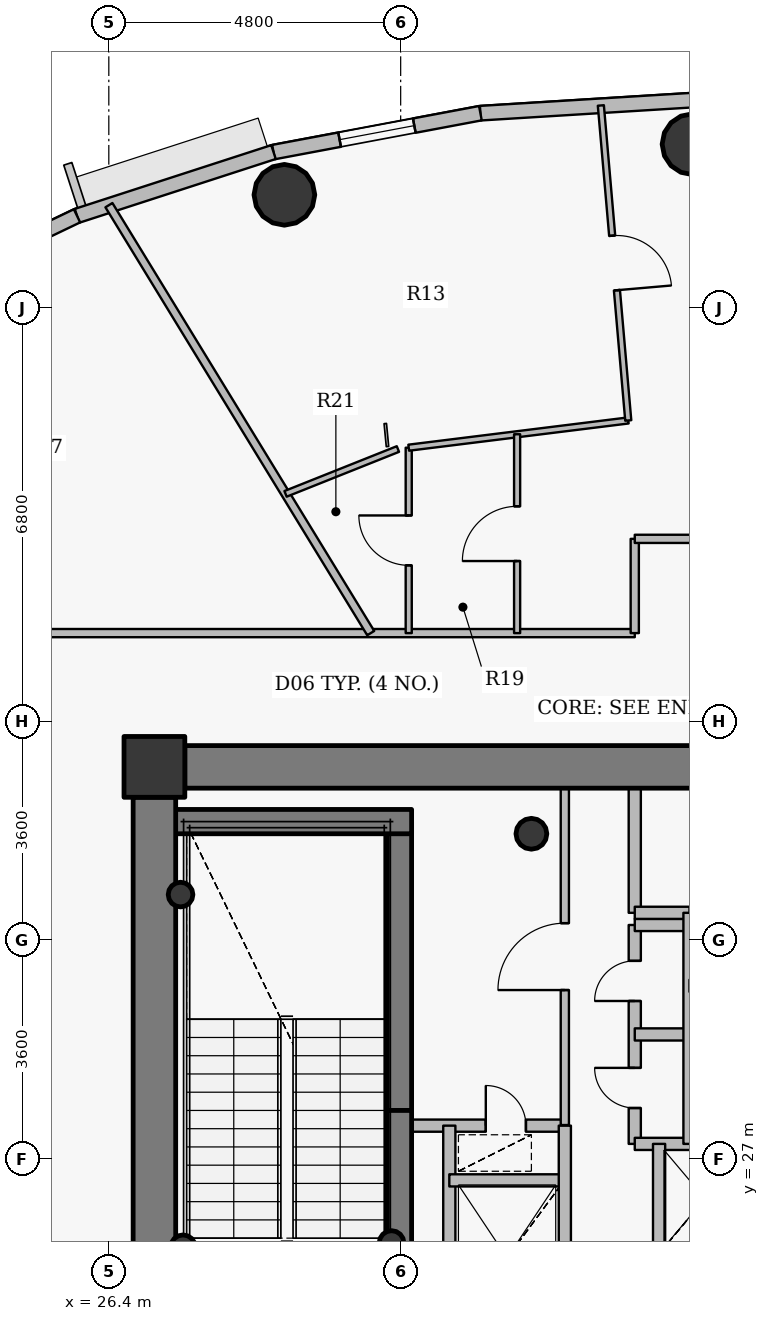
"""IFC4 building model, lengths in metres.
Left out: names, types, materials, properties, quantities, classifications, styles, units other than length and angle.
Written with IfcOpenShell. Run it as: python <this file> out.ifc"""

import sys

from ifc_helpers import new_model, si_unit, direction, frame, frame_2d, origin, origin_2d, place, context, subcontext, project, spatial, rectangle, hollow_circle, extrude, source, transform, mapped, element, fill, save


model = new_model("IFC4")
c1 = context("Model", 3, precision=1e-05, world=origin(), true_north=direction((0.0, 1.0)))
c2 = subcontext(c1, "Body", "Model", "MODEL_VIEW")
j1 = project(units=[si_unit("LENGTHUNIT", "METRE"), si_unit("PLANEANGLEUNIT", "RADIAN")], contexts=[c1])
p1 = place(None, origin())
s1 = spatial("IfcSite", under=j1, at=p1, CompositionType="ELEMENT")
p2 = place(p1, origin())
s2 = spatial("IfcBuilding", under=s1, at=p2, CompositionType="ELEMENT")
p3 = place(p2, frame((0.0, 0.0, 291.75)))
s3 = spatial("IfcBuildingStorey", under=s2, at=p3, CompositionType="ELEMENT", Elevation=291.75)
p4 = place(p3, frame((27.15, 33.45, 0.0), z_axis=(0.0, 0.0, 1.0), x_axis=(1.0, 0.0, 0.0)))
e1 = element("IfcColumn", 1, at=p4, inside=s3, PredefinedType="COLUMN", context=c2, shape_type="SweptSolid", body=[
    extrude(rectangle(XDim=1.0, YDim=1.0, at=origin_2d()), origin(), (0.0, 0.0, 1.0), 3.75),
])
p5 = place(p3, frame((33.35, 32.35, 0.0), z_axis=(0.0, 0.0, 1.0), x_axis=(1.0, 0.0, 0.0)))
e2 = element("IfcColumn", 2, at=p5, inside=s3, PredefinedType="COLUMN", context=c2, shape_type="SweptSolid", body=[
    extrude(hollow_circle(Radius=0.254, WallThickness=0.02, at=origin_2d()), origin(), (0.0, 0.0, 1.0), 3.75),
])
p6 = place(p3, frame((31.18, 27.8, 0.0), z_axis=(0.0, 0.0, 1.0), x_axis=(0.0, 1.0, 0.0)))
e3 = element("IfcWall", 3, at=p6, inside=s3, PredefinedType="SHEAR", context=c2, shape_type="SweptSolid", body=[
    extrude(rectangle(XDim=4.75, YDim=0.4, at=frame_2d((2.375, 0.0))), origin(), (0.0, 0.0, 1.0), 3.75),
])
p7 = place(p3, frame((27.25, 32.55, 0.0), z_axis=(0.0, 0.0, 1.0), x_axis=(1.0, 0.0, 0.0)))
e4 = element("IfcWall", 4, at=p7, inside=s3, PredefinedType="SHEAR", context=c2, shape_type="SweptSolid", body=[
    extrude(rectangle(XDim=4.13, YDim=0.4, at=frame_2d((2.065, 0.0))), origin(), (0.0, 0.0, 1.0), 3.75),
])
for number, where, z_axis, x_axis in (
    (5, (27.58, 31.35, 0.0), (0.0, 0.0, 1.0), (1.0, 0.0, 0.0)),
    (6, (31.05, 25.62, 0.0), (0.0, 0.0, 1.0), (1.0, 0.0, 0.0)),
    (7, (27.62, 25.55, 0.0), (0.0, 0.0, 1.0), (1.0, 0.0, 0.0)),
):
    element("IfcColumn", number, at=place(p3, frame(where, z_axis=z_axis, x_axis=x_axis)), inside=s3, PredefinedType="COLUMN", context=c2, shape_type="SweptSolid", body=[
        extrude(hollow_circle(Radius=0.203, WallThickness=0.016, at=origin_2d()), origin(), (0.0, 0.0, 1.0), 3.75),
    ])
p8 = place(p3, frame((27.65, 33.45, 0.0), z_axis=(0.0, 0.0, 1.0), x_axis=(1.0, 0.0, 0.0)))
e8 = element("IfcWall", 8, at=p8, inside=s3, PredefinedType="SHEAR", context=c2, shape_type="SweptSolid", body=[
    extrude(rectangle(XDim=16.7, YDim=0.7, at=frame_2d((8.35, 0.0))), origin(), (0.0, 0.0, 1.0), 3.05),
])
p9 = place(p8, frame((12.775, 0.0, 0.0)))
e9 = element("IfcOpeningElement", 9, at=p9, cuts=e8, PredefinedType="OPENING", context=c2, shape_type="SweptSolid", body=[
    extrude(rectangle(XDim=1.15, YDim=2.15, at=origin_2d()), frame((0.575, 0.36, 1.075), z_axis=(0.0, -1.0, 0.0), x_axis=(1.0, 0.0, 0.0)), (0.0, 0.0, 1.0), 0.72),
])
p10 = place(p3, frame((27.15, 21.05, 0.0), z_axis=(0.0, 0.0, 1.0), x_axis=(0.0, 1.0, 0.0)))
e10 = element("IfcWall", 10, at=p10, inside=s3, PredefinedType="SHEAR", context=c2, shape_type="SweptSolid", body=[
    extrude(rectangle(XDim=11.9, YDim=0.7, at=frame_2d((5.95, 0.0))), origin(), (0.0, 0.0, 1.0), 3.05),
])
p11 = place(p3, frame((31.18, 25.55, 0.0), z_axis=(0.0, 0.0, 1.0), x_axis=(0.0, 1.0, 0.0)))
e11 = element("IfcWall", 11, at=p11, inside=s3, PredefinedType="SHEAR", context=c2, shape_type="SweptSolid", body=[
    extrude(rectangle(XDim=2.25, YDim=0.4, at=frame_2d((1.125, 0.0))), origin(), (0.0, 0.0, 1.0), 3.1),
])
for number, where, z_axis, x_axis in (
    (12, (36.0, 43.69, 0.0), (0.0, 0.0, 1.0), (1.0, 0.0, 0.0)),
    (13, (29.288, 42.858, 0.0), (0.0, 0.0, 1.0), (1.0, 0.0, 0.0)),
):
    element("IfcColumn", number, at=place(p3, frame(where, z_axis=z_axis, x_axis=x_axis)), inside=s3, PredefinedType="COLUMN", context=c2, shape_type="SweptSolid", body=[
        extrude(hollow_circle(Radius=0.5, WallThickness=0.032, at=origin_2d()), origin(), (0.0, 0.0, 1.0), 3.75),
    ])
p12 = place(p3, frame((32.511, 44.2, 0.0), z_axis=(0.0, 0.0, 1.0), x_axis=(0.998104946479, 0.061534671648, 0.0)))
e14 = element("IfcWall", 14, at=p12, inside=s3, PredefinedType="SOLIDWALL", context=c2, shape_type="SweptSolid", body=[
    extrude(rectangle(XDim=3.495, YDim=0.24, at=frame_2d((1.748, 0.0))), origin(), (0.0, 0.0, 1.0), 3.5),
])
p13 = place(p3, frame((29.109, 43.56, 0.0), z_axis=(0.0, 0.0, 1.0), x_axis=(0.982782655757, 0.184765395959, 0.0)))
e15 = element("IfcWall", 15, at=p13, inside=s3, PredefinedType="SOLIDWALL", context=c2, shape_type="SweptSolid", body=[
    extrude(rectangle(XDim=3.462, YDim=0.24, at=frame_2d((1.731, 0.0))), origin(), (0.0, 0.0, 1.0), 3.5),
])
p14 = place(p13, frame((1.106, 0.0, 0.9)))
e16 = element("IfcOpeningElement", 16, at=p14, cuts=e15, PredefinedType="OPENING", context=c2, shape_type="SweptSolid", body=[
    extrude(rectangle(XDim=1.25, YDim=1.65, at=origin_2d()), frame((0.625, 0.13, 0.825), z_axis=(0.0, -1.0, 0.0), x_axis=(1.0, 0.0, 0.0)), (0.0, 0.0, 1.0), 0.26),
])
p15 = place(p3, frame((25.877, 42.512, 0.0), z_axis=(0.0, 0.0, 1.0), x_axis=(0.95123136723, 0.308478339592, 0.0)))
e17 = element("IfcWall", 17, at=p15, inside=s3, PredefinedType="SOLIDWALL", context=c2, shape_type="SweptSolid", body=[
    extrude(rectangle(XDim=3.398, YDim=0.24, at=frame_2d((1.699, 0.0))), origin(), (0.0, 0.0, 1.0), 3.5),
])
p16 = place(p3, frame((22.896, 41.082, 0.0), z_axis=(0.0, 0.0, 1.0), x_axis=(0.901573741254, 0.43262546051, 0.0)))
e18 = element("IfcWall", 18, at=p16, inside=s3, PredefinedType="SOLIDWALL", context=c2, shape_type="SweptSolid", body=[
    extrude(rectangle(XDim=3.307, YDim=0.24, at=frame_2d((1.653, 0.0))), origin(), (0.0, 0.0, 1.0), 3.5),
])
p17 = place(p16, frame((0.854, 0.0, 0.9)))
e19 = element("IfcOpeningElement", 19, at=p17, cuts=e18, PredefinedType="OPENING", context=c2, shape_type="SweptSolid", body=[
    extrude(rectangle(XDim=1.6, YDim=1.75, at=origin_2d()), frame((0.8, 0.13, 0.875), z_axis=(0.0, -1.0, 0.0), x_axis=(1.0, 0.0, 0.0)), (0.0, 0.0, 1.0), 0.26),
])
p18 = place(p3, frame((24.95, 35.65, 0.0), z_axis=(0.0, 0.0, 1.0), x_axis=(1.0, 0.0, 0.0)))
e20 = element("IfcWall", 20, at=p18, inside=s3, PredefinedType="PARTITIONING", context=c2, shape_type="SweptSolid", body=[
    extrude(rectangle(XDim=10.1, YDim=0.135, at=frame_2d((5.05, 0.0))), origin(), (0.0, 0.0, 1.0), 3.035),
])
p19 = place(p3, frame((26.402, 42.688, 0.0), z_axis=(0.0, 0.0, 1.0), x_axis=(0.521891606098, -0.853011812043, 0.0)))
e21 = element("IfcWall", 21, at=p19, inside=s3, PredefinedType="PARTITIONING", context=c2, shape_type="SweptSolid", body=[
    extrude(rectangle(XDim=8.25, YDim=0.135, at=frame_2d((4.125, 0.0))), origin(), (0.0, 0.0, 1.0), 2.985),
])
p20 = place(p3, frame((29.307, 37.94, 0.0), z_axis=(0.0, 0.0, 1.0), x_axis=(0.928797929692, 0.370586569913, 0.0)))
e22 = element("IfcWall", 22, at=p20, inside=s3, PredefinedType="PARTITIONING", context=c2, shape_type="SweptSolid", body=[
    extrude(rectangle(XDim=1.99, YDim=0.1, at=frame_2d((0.995, 0.0))), origin(), (0.0, 0.0, 1.0), 3.035),
])
p21 = place(p3, frame((31.1, 27.55, 0.0), z_axis=(0.0, 0.0, 1.0), x_axis=(1.0, 0.0, 0.0)))
e23 = element("IfcWall", 23, at=p21, inside=s3, PredefinedType="PARTITIONING", context=c2, shape_type="SweptSolid", body=[
    extrude(rectangle(XDim=2.8, YDim=0.2, at=frame_2d((1.4, 0.0))), origin(), (0.0, 0.0, 1.0), 3.085),
])
p22 = place(p21, frame((1.5, 0.0, 0.0)))
e24 = element("IfcOpeningElement", 24, at=p22, cuts=e23, PredefinedType="OPENING", context=c2, shape_type="SweptSolid", body=[
    extrude(rectangle(XDim=0.66, YDim=2.05, at=origin_2d()), frame((0.33, 0.11, 1.025), z_axis=(0.0, -1.0, 0.0), x_axis=(1.0, 0.0, 0.0)), (0.0, 0.0, 1.0), 0.22),
])
p23 = place(p3, frame((31.333, 35.65, 0.0), z_axis=(0.0, 0.0, 1.0), x_axis=(0.0, 1.0, 0.0)))
e25 = element("IfcWall", 25, at=p23, inside=s3, PredefinedType="PARTITIONING", context=c2, shape_type="SweptSolid", body=[
    extrude(rectangle(XDim=3.049, YDim=0.1, at=frame_2d((1.525, 0.0))), origin(), (0.0, 0.0, 1.0), 3.035),
])
p24 = place(p23, frame((1.115, 0.0, 0.0)))
e26 = element("IfcOpeningElement", 26, at=p24, cuts=e25, PredefinedType="OPENING", context=c2, shape_type="SweptSolid", body=[
    extrude(rectangle(XDim=0.82, YDim=2.1, at=origin_2d()), frame((0.41, 0.06, 1.05), z_axis=(0.0, -1.0, 0.0), x_axis=(1.0, 0.0, 0.0)), (0.0, 0.0, 1.0), 0.12),
])
p25 = place(p3, frame((31.333, 38.699, 0.0), z_axis=(0.0, 0.0, 1.0), x_axis=(0.992398193069, 0.123068380965, 0.0)))
e27 = element("IfcWall", 27, at=p25, inside=s3, PredefinedType="PARTITIONING", context=c2, shape_type="SweptSolid", body=[
    extrude(rectangle(XDim=3.638, YDim=0.1, at=frame_2d((1.819, 0.0))), origin(), (0.0, 0.0, 1.0), 3.185),
])
p26 = place(p3, frame((32.0, 24.1, 0.0), z_axis=(0.0, 0.0, 1.0), x_axis=(0.0, 1.0, 0.0)))
e28 = element("IfcWall", 28, at=p26, inside=s3, PredefinedType="PARTITIONING", context=c2, shape_type="SweptSolid", body=[
    extrude(rectangle(XDim=3.45, YDim=0.2, at=frame_2d((1.725, 0.0))), origin(), (0.0, 0.0, 1.0), 3.5),
])
p27 = place(p3, frame((32.0, 26.65, 0.0), z_axis=(0.0, 0.0, 1.0), x_axis=(1.0, 0.0, 0.0)))
e29 = element("IfcWall", 29, at=p27, inside=s3, PredefinedType="PARTITIONING", context=c2, shape_type="SweptSolid", body=[
    extrude(rectangle(XDim=1.9, YDim=0.2, at=frame_2d((0.95, 0.0))), origin(), (0.0, 0.0, 1.0), 3.085),
])
p28 = place(p3, frame((33.115, 35.65, 0.0), z_axis=(0.0, 0.0, 1.0), x_axis=(0.0, 1.0, 0.0)))
e30 = element("IfcWall", 30, at=p28, inside=s3, PredefinedType="PARTITIONING", context=c2, shape_type="SweptSolid", body=[
    extrude(rectangle(XDim=3.27, YDim=0.1, at=frame_2d((1.635, 0.0))), origin(), (0.0, 0.0, 1.0), 3.5),
])
p29 = place(p28, frame((1.185, 0.0, 0.0)))
e31 = element("IfcOpeningElement", 31, at=p29, cuts=e30, PredefinedType="OPENING", context=c2, shape_type="SweptSolid", body=[
    extrude(rectangle(XDim=0.9, YDim=2.1, at=origin_2d()), frame((0.45, 0.06, 1.05), z_axis=(0.0, -1.0, 0.0), x_axis=(1.0, 0.0, 0.0)), (0.0, 0.0, 1.0), 0.12),
])
p30 = place(p3, frame((33.9, 20.9, 0.0), z_axis=(0.0, 0.0, 1.0), x_axis=(0.0, 1.0, 0.0)))
e32 = element("IfcWall", 32, at=p30, inside=s3, PredefinedType="PARTITIONING", context=c2, shape_type="SweptSolid", body=[
    extrude(rectangle(XDim=6.65, YDim=0.2, at=frame_2d((3.325, 0.0))), origin(), (0.0, 0.0, 1.0), 3.085),
])
p31 = place(p3, frame((33.9, 27.56, 0.0), z_axis=(0.0, 0.0, 1.0), x_axis=(0.0, 1.0, 0.0)))
e33 = element("IfcWall", 33, at=p31, inside=s3, PredefinedType="PARTITIONING", context=c2, shape_type="SweptSolid", body=[
    extrude(rectangle(XDim=5.54, YDim=0.135, at=frame_2d((2.77, 0.0))), origin(), (0.0, 0.0, 1.0), 3.085),
])
p32 = place(p31, frame((2.22, 0.0, 0.0)))
e34 = element("IfcOpeningElement", 34, at=p32, cuts=e33, PredefinedType="OPENING", context=c2, shape_type="SweptSolid", body=[
    extrude(rectangle(XDim=1.1, YDim=2.15, at=origin_2d()), frame((0.55, 0.078, 1.075), z_axis=(0.0, -1.0, 0.0), x_axis=(1.0, 0.0, 0.0)), (0.0, 0.0, 1.0), 0.155),
])
p33 = place(p3, frame((34.492, 44.327, 0.0), z_axis=(0.0, 0.0, 1.0), x_axis=(0.086674190257, -0.9962367112, 0.0)))
e35 = element("IfcWall", 35, at=p33, inside=s3, PredefinedType="PARTITIONING", context=c2, shape_type="SweptSolid", body=[
    extrude(rectangle(XDim=5.2, YDim=0.1, at=frame_2d((2.6, 0.0))), origin(), (0.0, 0.0, 1.0), 2.985),
])
p34 = place(p33, frame((2.15, 0.0, 0.0)))
e36 = element("IfcOpeningElement", 36, at=p34, cuts=e35, PredefinedType="OPENING", context=c2, shape_type="SweptSolid", body=[
    extrude(rectangle(XDim=0.9, YDim=2.1, at=origin_2d()), frame((0.45, 0.06, 1.05), z_axis=(0.0, -1.0, 0.0), x_axis=(1.0, 0.0, 0.0)), (0.0, 0.0, 1.0), 0.12),
])
p35 = place(p3, frame((35.05, 27.25, 0.0), z_axis=(0.0, 0.0, 1.0), x_axis=(0.0, 1.0, 0.0)))
e37 = element("IfcWall", 37, at=p35, inside=s3, PredefinedType="PARTITIONING", context=c2, shape_type="SweptSolid", body=[
    extrude(rectangle(XDim=3.6, YDim=0.2, at=frame_2d((1.8, 0.0))), origin(), (0.0, 0.0, 1.0), 3.5),
])
p36 = place(p35, frame((0.59, 0.0, 0.0)))
e38 = element("IfcOpeningElement", 38, at=p36, cuts=e37, PredefinedType="OPENING", context=c2, shape_type="SweptSolid", body=[
    extrude(rectangle(XDim=0.66, YDim=2.05, at=origin_2d()), frame((0.33, 0.11, 1.025), z_axis=(0.0, -1.0, 0.0), x_axis=(1.0, 0.0, 0.0)), (0.0, 0.0, 1.0), 0.22),
])
p37 = place(p35, frame((2.35, 0.0, 0.0)))
e39 = element("IfcOpeningElement", 39, at=p37, cuts=e37, PredefinedType="OPENING", context=c2, shape_type="SweptSolid", body=[
    extrude(rectangle(XDim=0.66, YDim=2.05, at=origin_2d()), frame((0.33, 0.11, 1.025), z_axis=(0.0, -1.0, 0.0), x_axis=(1.0, 0.0, 0.0)), (0.0, 0.0, 1.0), 0.22),
])
p38 = place(p3, frame((35.05, 27.25, 0.0), z_axis=(0.0, 0.0, 1.0), x_axis=(1.0, 0.0, 0.0)))
e40 = element("IfcWall", 40, at=p38, inside=s3, PredefinedType="PARTITIONING", context=c2, shape_type="SweptSolid", body=[
    extrude(rectangle(XDim=4.95, YDim=0.2, at=frame_2d((2.475, 0.0))), origin(), (0.0, 0.0, 1.0), 3.085),
])
for number, where, z_axis, x_axis in (
    (41, (35.05, 29.05, 0.0), (0.0, 0.0, 1.0), (1.0, 0.0, 0.0)),
    (42, (35.05, 30.85, 0.0), (0.0, 0.0, 1.0), (1.0, 0.0, 0.0)),
):
    element("IfcWall", number, at=place(p3, frame(where, z_axis=z_axis, x_axis=x_axis)), inside=s3, PredefinedType="PARTITIONING", context=c2, shape_type="SweptSolid", body=[
        extrude(rectangle(XDim=0.9, YDim=0.2, at=frame_2d((0.45, 0.0))), origin(), (0.0, 0.0, 1.0), 3.5),
    ])
p39 = place(p3, frame((35.05, 31.05, 0.0), z_axis=(0.0, 0.0, 1.0), x_axis=(0.0, 1.0, 0.0)))
e43 = element("IfcWall", 43, at=p39, inside=s3, PredefinedType="PARTITIONING", context=c2, shape_type="SweptSolid", body=[
    extrude(rectangle(XDim=2.05, YDim=0.2, at=frame_2d((1.025, 0.0))), origin(), (0.0, 0.0, 1.0), 3.085),
])
p40 = place(p3, frame((35.05, 31.05, 0.0), z_axis=(0.0, 0.0, 1.0), x_axis=(1.0, 0.0, 0.0)))
e44 = element("IfcWall", 44, at=p40, inside=s3, PredefinedType="PARTITIONING", context=c2, shape_type="SweptSolid", body=[
    extrude(rectangle(XDim=0.9, YDim=0.2, at=frame_2d((0.45, 0.0))), origin(), (0.0, 0.0, 1.0), 3.5),
])
p41 = place(p3, frame((35.05, 35.65, 0.0), z_axis=(0.0, 0.0, 1.0), x_axis=(0.0, 1.0, 0.0)))
e45 = element("IfcWall", 45, at=p41, inside=s3, PredefinedType="PARTITIONING", context=c2, shape_type="SweptSolid", body=[
    extrude(rectangle(XDim=1.55, YDim=0.135, at=frame_2d((0.775, 0.0))), origin(), (0.0, 0.0, 1.0), 3.5),
])
p42 = place(p3, frame((35.05, 37.2, 0.0), z_axis=(0.0, 0.0, 1.0), x_axis=(1.0, 0.0, 0.0)))
e46 = element("IfcWall", 46, at=p42, inside=s3, PredefinedType="PARTITIONING", context=c2, shape_type="SweptSolid", body=[
    extrude(rectangle(XDim=1.9, YDim=0.135, at=frame_2d((0.95, 0.0))), origin(), (0.0, 0.0, 1.0), 3.035),
])
p43 = place(p3, frame((35.45, 25.45, 0.0), z_axis=(0.0, 0.0, 1.0), x_axis=(0.0, 1.0, 0.0)))
e47 = element("IfcWall", 47, at=p43, inside=s3, PredefinedType="PARTITIONING", context=c2, shape_type="SweptSolid", body=[
    extrude(rectangle(XDim=1.8, YDim=0.2, at=frame_2d((0.9, 0.0))), origin(), (0.0, 0.0, 1.0), 3.5),
])
p44 = place(p3, frame((35.95, 27.25, 0.0), z_axis=(0.0, 0.0, 1.0), x_axis=(0.0, 1.0, 0.0)))
e48 = element("IfcWall", 48, at=p44, inside=s3, PredefinedType="PARTITIONING", context=c2, shape_type="SweptSolid", body=[
    extrude(rectangle(XDim=3.8, YDim=0.2, at=frame_2d((1.9, 0.0))), origin(), (0.0, 0.0, 1.0), 3.5),
])
p45 = place(p3, frame((27.64, 33.8, 0.0), z_axis=(0.0, 0.0, 1.0), x_axis=(-1.0, 0.0, 0.0)))
e49 = element("IfcWall", 49, at=p45, inside=s3, PredefinedType="PARTITIONING", context=c2, shape_type="SweptSolid", body=[
    extrude(rectangle(XDim=0.84, YDim=0.135, at=frame_2d((0.42, 0.0))), origin(), (0.0, 0.0, 1.0), 3.035),
])
p46 = place(p3, frame((26.8, 33.492, 0.0), z_axis=(0.0, 0.0, 1.0), x_axis=(0.0, -1.0, 0.0)))
e50 = element("IfcWall", 50, at=p46, inside=s3, PredefinedType="PARTITIONING", context=c2, shape_type="SweptSolid", body=[
    extrude(rectangle(XDim=0.532, YDim=0.135, at=frame_2d((0.266, 0.0))), origin(), (0.0, 0.0, 1.0), 3.5),
])
m1 = source(origin(), c2, "Body", "SweptSolid", [
    extrude(rectangle(XDim=1.25, YDim=1.65, at=origin_2d()), frame((0.625, 0.03, 0.825), z_axis=(0.0, -1.0, 0.0), x_axis=(1.0, 0.0, 0.0)), (0.0, 0.0, 1.0), 0.06),
])
p47 = place(p14, origin())
e51 = element("IfcWindow", 51, at=p47, inside=s3, PartitioningType="SINGLE_PANEL", PredefinedType="WINDOW", context=c2, shape_type="MappedRepresentation", body=[
    mapped(m1, transform((0.0, 0.0, 0.0), x_axis=(1.0, 0.0, 0.0), y_axis=(0.0, 1.0, 0.0), z_axis=(0.0, 0.0, 1.0), scale=1.0)),
])
fill(e16, e51)
m2 = source(origin(), c2, "Body", "SweptSolid", [
    extrude(rectangle(XDim=0.9, YDim=2.1, at=origin_2d()), frame((0.45, 0.025, 1.05), z_axis=(0.0, -1.0, 0.0), x_axis=(1.0, 0.0, 0.0)), (0.0, 0.0, 1.0), 0.05),
])
p48 = place(p34, origin())
e52 = element("IfcDoor", 52, at=p48, inside=s3, OperationType="SINGLE_SWING_RIGHT", PredefinedType="DOOR", context=c2, shape_type="MappedRepresentation", body=[
    mapped(m2, transform((0.0, 0.0, 0.0), x_axis=(1.0, 0.0, 0.0), y_axis=(0.0, 1.0, 0.0), z_axis=(0.0, 0.0, 1.0), scale=1.0)),
])
fill(e36, e52)
p49 = place(p29, origin())
e53 = element("IfcDoor", 53, at=p49, inside=s3, OperationType="SINGLE_SWING_LEFT", PredefinedType="DOOR", context=c2, shape_type="MappedRepresentation", body=[
    mapped(m2, transform((0.0, 0.0, 0.0), x_axis=(1.0, 0.0, 0.0), y_axis=(0.0, 1.0, 0.0), z_axis=(0.0, 0.0, 1.0), scale=1.0)),
])
fill(e31, e53)
m3 = source(origin(), c2, "Body", "SweptSolid", [
    extrude(rectangle(XDim=0.82, YDim=2.1, at=origin_2d()), frame((0.41, 0.025, 1.05), z_axis=(0.0, -1.0, 0.0), x_axis=(1.0, 0.0, 0.0)), (0.0, 0.0, 1.0), 0.05),
])
p50 = place(p24, origin())
e54 = element("IfcDoor", 54, at=p50, inside=s3, OperationType="SINGLE_SWING_RIGHT", PredefinedType="DOOR", context=c2, shape_type="MappedRepresentation", body=[
    mapped(m3, transform((0.0, 0.0, 0.0), x_axis=(1.0, 0.0, 0.0), y_axis=(0.0, 1.0, 0.0), z_axis=(0.0, 0.0, 1.0), scale=1.0)),
])
fill(e26, e54)
m4 = source(origin(), c2, "Body", "SweptSolid", [
    extrude(rectangle(XDim=0.66, YDim=2.05, at=origin_2d()), frame((0.33, 0.025, 1.025), z_axis=(0.0, -1.0, 0.0), x_axis=(1.0, 0.0, 0.0)), (0.0, 0.0, 1.0), 0.05),
])
p51 = place(p36, origin())
e55 = element("IfcDoor", 55, at=p51, inside=s3, OperationType="SINGLE_SWING_RIGHT", PredefinedType="USERDEFINED", context=c2, shape_type="MappedRepresentation", body=[
    mapped(m4, transform((0.0, 0.0, 0.0), x_axis=(1.0, 0.0, 0.0), y_axis=(0.0, 1.0, 0.0), z_axis=(0.0, 0.0, 1.0), scale=1.0)),
])
fill(e38, e55)
p52 = place(p37, origin())
e56 = element("IfcDoor", 56, at=p52, inside=s3, OperationType="SINGLE_SWING_LEFT", PredefinedType="USERDEFINED", context=c2, shape_type="MappedRepresentation", body=[
    mapped(m4, transform((0.0, 0.0, 0.0), x_axis=(1.0, 0.0, 0.0), y_axis=(0.0, 1.0, 0.0), z_axis=(0.0, 0.0, 1.0), scale=1.0)),
])
fill(e39, e56)
m5 = source(origin(), c2, "Body", "SweptSolid", [
    extrude(rectangle(XDim=1.1, YDim=2.15, at=origin_2d()), frame((0.55, 0.025, 1.075), z_axis=(0.0, -1.0, 0.0), x_axis=(1.0, 0.0, 0.0)), (0.0, 0.0, 1.0), 0.05),
])
p53 = place(p32, origin())
e57 = element("IfcDoor", 57, at=p53, inside=s3, OperationType="SINGLE_SWING_LEFT", PredefinedType="DOOR", context=c2, shape_type="MappedRepresentation", body=[
    mapped(m5, transform((0.0, 0.0, 0.0), x_axis=(1.0, 0.0, 0.0), y_axis=(0.0, 1.0, 0.0), z_axis=(0.0, 0.0, 1.0), scale=1.0)),
])
fill(e34, e57)
p54 = place(p22, origin())
e58 = element("IfcDoor", 58, at=p54, inside=s3, OperationType="SINGLE_SWING_LEFT", PredefinedType="USERDEFINED", context=c2, shape_type="MappedRepresentation", body=[
    mapped(m4, transform((0.0, 0.0, 0.0), x_axis=(1.0, 0.0, 0.0), y_axis=(0.0, 1.0, 0.0), z_axis=(0.0, 0.0, 1.0), scale=1.0)),
])
fill(e24, e58)
save(model, sys.argv[1])
